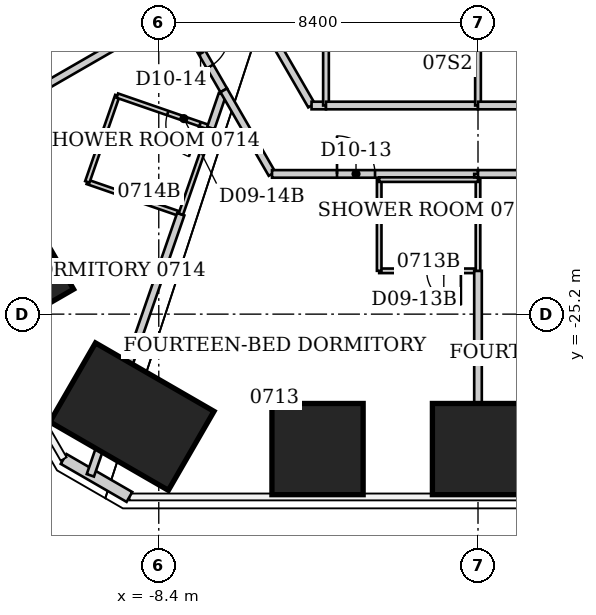
"""IFC4 building model, lengths in metres.
Left out: names, types, materials, properties, quantities, classifications, styles, units other than length and angle.
Written with IfcOpenShell. Run it as: python <this file> out.ifc"""

import sys

from ifc_helpers import new_model, si_unit, direction, frame, frame_2d, origin, origin_2d, place, context, subcontext, project, spatial, rectangle, extrude, element, fill, save


model = new_model("IFC4")
c1 = context("Model", 3, precision=1e-05, world=origin(), true_north=direction((0.0, 1.0)))
c2 = subcontext(c1, "Body", "Model", "MODEL_VIEW")
j1 = project(units=[si_unit("LENGTHUNIT", "METRE"), si_unit("PLANEANGLEUNIT", "RADIAN")], contexts=[c1])
p1 = place(None, origin())
s1 = spatial("IfcSite", under=j1, at=p1, CompositionType="ELEMENT")
p2 = place(p1, origin())
s2 = spatial("IfcBuilding", under=s1, at=p2, CompositionType="ELEMENT")
p3 = place(p2, frame((0.0, 0.0, 34.4)))
s3 = spatial("IfcBuildingStorey", under=s2, at=p3, CompositionType="ELEMENT", Elevation=34.4)
for number, where, z_axis, x_axis in (
    (1, (0.0, -28.751, 0.0), (0.0, 0.0, 1.0), (0.0, -1.0, 0.0)),
    (2, (-4.222, -28.751, 0.0), (0.0, 0.0, 1.0), (0.0, -1.0, 0.0)),
):
    element("IfcColumn", number, at=place(p3, frame(where, z_axis=z_axis, x_axis=x_axis)), inside=s3, PredefinedType="COLUMN", context=c2, shape_type="SweptSolid", body=[
        extrude(rectangle(XDim=2.4, YDim=2.4, at=origin_2d()), origin(), (0.0, 0.0, 1.0), 3.8),
    ])
p4 = place(p3, frame((-9.106, -27.897, 0.0), z_axis=(0.0, 0.0, 1.0), x_axis=(-0.5, -0.866025403784, 0.0)))
e3 = element("IfcColumn", 3, at=p4, inside=s3, PredefinedType="COLUMN", context=c2, shape_type="SweptSolid", body=[
    extrude(rectangle(XDim=2.4, YDim=3.6, at=origin_2d()), origin(), (0.0, 0.0, 1.0), 3.8),
])
p5 = place(p3, frame((-12.282, -24.105, 0.0), z_axis=(0.0, 0.0, 1.0), x_axis=(-0.866025403784, -0.5, 0.0)))
e4 = element("IfcColumn", 4, at=p5, inside=s3, PredefinedType="COLUMN", context=c2, shape_type="SweptSolid", body=[
    extrude(rectangle(XDim=2.4, YDim=2.4, at=origin_2d()), origin(), (0.0, 0.0, 1.0), 3.8),
])
p6 = place(p3, frame((-9.172, -30.011, 0.0), z_axis=(0.0, 0.0, 1.0), x_axis=(-0.866010750942, 0.50002537861, 0.0)))
e5 = element("IfcWall", 5, at=p6, inside=s3, PredefinedType="SOLIDWALL", context=c2, shape_type="SweptSolid", body=[
    extrude(rectangle(XDim=2.0, YDim=0.3, at=frame_2d((1.0, 0.0))), origin(), (0.0, 0.0, 1.0), 3.64),
])
p7 = place(p3, frame((-15.176, -21.38, 0.0), z_axis=(0.0, 0.0, 1.0), x_axis=(0.866276837306, 0.49956425127, 0.0)))
e6 = element("IfcWall", 6, at=p7, inside=s3, PredefinedType="PARTITIONING", context=c2, shape_type="SweptSolid", body=[
    extrude(rectangle(XDim=8.373, YDim=0.2, at=frame_2d((4.186, 0.0))), origin(), (0.0, 0.0, 1.0), 3.64),
])
p8 = place(p3, frame((-10.28, -21.72, 0.0), z_axis=(0.0, 0.0, 1.0), x_axis=(0.94515546045, -0.326620813149, 0.0)))
e7 = element("IfcWall", 7, at=p8, inside=s3, PredefinedType="PARTITIONING", context=c2, shape_type="SweptSolid", body=[
    extrude(rectangle(XDim=2.603, YDim=0.12, at=frame_2d((1.301, 0.0))), origin(), (0.0, 0.0, 1.0), 3.64),
])
p9 = place(p3, frame((-10.2, -29.442, 0.0), z_axis=(0.0, 0.0, 1.0), x_axis=(0.327154379454, 0.944970905374, 0.0)))
e8 = element("IfcWall", 8, at=p9, inside=s3, PredefinedType="PARTITIONING", context=c2, shape_type="SweptSolid", body=[
    extrude(rectangle(XDim=7.272, YDim=0.2, at=frame_2d((3.636, 0.0))), origin(), (0.0, 0.0, 1.0), 3.64),
])
p10 = place(p3, frame((-9.49, -19.45, 0.0), z_axis=(0.0, 0.0, 1.0), x_axis=(-0.328693963496, -0.944436487203, 0.0)))
e9 = element("IfcWall", 9, at=p10, inside=s3, PredefinedType="PARTITIONING", context=c2, shape_type="SweptSolid", body=[
    extrude(rectangle(XDim=2.404, YDim=0.12, at=frame_2d((1.202, 0.0))), origin(), (0.0, 0.0, 1.0), 3.64),
])
p11 = place(p3, frame((-7.91, -17.19, 0.0), z_axis=(0.0, 0.0, 1.0), x_axis=(0.498748634132, -0.866746675766, 0.0)))
e10 = element("IfcWall", 10, at=p11, inside=s3, PredefinedType="PARTITIONING", context=c2, shape_type="SweptSolid", body=[
    extrude(rectangle(XDim=2.446, YDim=0.2, at=frame_2d((1.223, 0.0))), origin(), (0.0, 0.0, 1.0), 3.64),
])
p12 = place(p11, frame((0.723, 0.0, 0.0)))
e11 = element("IfcOpeningElement", 11, at=p12, cuts=e10, PredefinedType="OPENING", context=c2, shape_type="SweptSolid", body=[
    extrude(rectangle(XDim=1.0, YDim=2.13, at=frame_2d((0.5, 1.065))), frame((0.0, 0.1, 0.0), z_axis=(0.0, -1.0, 0.0), x_axis=(1.0, 0.0, 0.0)), (0.0, 0.0, 1.0), 0.2),
])
p13 = place(p3, frame((-7.82, -22.57, 0.0), z_axis=(0.0, 0.0, 1.0), x_axis=(0.328693963496, 0.944436487203, 0.0)))
e12 = element("IfcWall", 12, at=p13, inside=s3, PredefinedType="PARTITIONING", context=c2, shape_type="SweptSolid", body=[
    extrude(rectangle(XDim=2.404, YDim=0.12, at=frame_2d((1.202, 0.0))), origin(), (0.0, 0.0, 1.0), 3.64),
])
p14 = place(p3, frame((-7.03, -20.3, 0.0), z_axis=(0.0, 0.0, 1.0), x_axis=(-0.94515546045, 0.326620813149, 0.0)))
e13 = element("IfcWall", 13, at=p14, inside=s3, PredefinedType="PARTITIONING", context=c2, shape_type="SweptSolid", body=[
    extrude(rectangle(XDim=2.603, YDim=0.12, at=frame_2d((1.301, 0.0))), origin(), (0.0, 0.0, 1.0), 3.64),
])
p15 = place(p14, frame((0.3, 0.0, 0.0)))
e14 = element("IfcOpeningElement", 14, at=p15, cuts=e13, PredefinedType="OPENING", context=c2, shape_type="SweptSolid", body=[
    extrude(rectangle(XDim=0.9, YDim=2.03, at=frame_2d((0.45, 1.015))), frame((0.0, 0.06, 0.0), z_axis=(0.0, -1.0, 0.0), x_axis=(1.0, 0.0, 0.0)), (0.0, 0.0, 1.0), 0.12),
])
p16 = place(p3, frame((-7.03, -20.3, 0.0), z_axis=(0.0, 0.0, 1.0), x_axis=(0.324737408014, 0.94580421644, 0.0)))
e15 = element("IfcWall", 15, at=p16, inside=s3, PredefinedType="PARTITIONING", context=c2, shape_type="SweptSolid", body=[
    extrude(rectangle(XDim=0.937, YDim=0.2, at=frame_2d((0.468, 0.0))), origin(), (0.0, 0.0, 1.0), 3.64),
])
p17 = place(p3, frame((-6.69, -19.31, 0.0), z_axis=(0.0, 0.0, 1.0), x_axis=(0.499963722229, -0.866046347752, 0.0)))
e16 = element("IfcWall", 16, at=p17, inside=s3, PredefinedType="PARTITIONING", context=c2, shape_type="SweptSolid", body=[
    extrude(rectangle(XDim=2.54, YDim=0.2, at=frame_2d((1.27, 0.0))), origin(), (0.0, 0.0, 1.0), 3.64),
])
p18 = place(p3, frame((-5.42, -21.51, 0.0), z_axis=(0.0, 0.0, 1.0), x_axis=(1.0, 0.0, 0.0)))
e17 = element("IfcWall", 17, at=p18, inside=s3, PredefinedType="PARTITIONING", context=c2, shape_type="SweptSolid", body=[
    extrude(rectangle(XDim=5.42, YDim=0.2, at=frame_2d((2.71, 0.0))), origin(), (0.0, 0.0, 1.0), 3.64),
])
p19 = place(p18, frame((1.71, 0.0, 0.0)))
e18 = element("IfcOpeningElement", 18, at=p19, cuts=e17, PredefinedType="OPENING", context=c2, shape_type="SweptSolid", body=[
    extrude(rectangle(XDim=1.0, YDim=2.13, at=frame_2d((0.5, 1.065))), frame((0.0, 0.1, 0.0), z_axis=(0.0, -1.0, 0.0), x_axis=(1.0, 0.0, 0.0)), (0.0, 0.0, 1.0), 0.2),
])
p20 = place(p3, frame((-4.38, -19.71, 0.0), z_axis=(0.0, 0.0, 1.0), x_axis=(-0.500523653757, 0.865722860984, 0.0)))
e19 = element("IfcWall", 19, at=p20, inside=s3, PredefinedType="PARTITIONING", context=c2, shape_type="SweptSolid", body=[
    extrude(rectangle(XDim=6.628, YDim=0.2, at=frame_2d((3.314, 0.0))), origin(), (0.0, 0.0, 1.0), 3.64),
])
p21 = place(p20, frame((2.764, 0.0, 0.0)))
e20 = element("IfcOpeningElement", 20, at=p21, cuts=e19, PredefinedType="OPENING", context=c2, shape_type="SweptSolid", body=[
    extrude(rectangle(XDim=1.1, YDim=2.2, at=frame_2d((0.55, 1.1))), frame((0.0, 0.1, 0.0), z_axis=(0.0, -1.0, 0.0), x_axis=(1.0, 0.0, 0.0)), (0.0, 0.0, 1.0), 0.2),
])
p22 = place(p3, frame((-4.0, -19.71, 0.0), z_axis=(0.0, 0.0, 1.0), x_axis=(-1.0, 0.0, 0.0)))
e21 = element("IfcWall", 21, at=p22, inside=s3, PredefinedType="PARTITIONING", context=c2, shape_type="SweptSolid", body=[
    extrude(rectangle(XDim=0.38, YDim=0.2, at=frame_2d((0.19, 0.0))), origin(), (0.0, 0.0, 1.0), 3.64),
])
p23 = place(p3, frame((-4.0, -14.0, 0.0), z_axis=(0.0, 0.0, 1.0), x_axis=(0.0, -1.0, 0.0)))
e22 = element("IfcWall", 22, at=p23, inside=s3, PredefinedType="PARTITIONING", context=c2, shape_type="SweptSolid", body=[
    extrude(rectangle(XDim=5.71, YDim=0.15, at=frame_2d((2.855, 0.0))), origin(), (0.0, 0.0, 1.0), 3.64),
])
p24 = place(p3, frame((-2.6, -24.06, 0.0), z_axis=(0.0, 0.0, 1.0), x_axis=(1.0, 0.0, 0.0)))
e23 = element("IfcWall", 23, at=p24, inside=s3, PredefinedType="PARTITIONING", context=c2, shape_type="SweptSolid", body=[
    extrude(rectangle(XDim=2.6, YDim=0.12, at=frame_2d((1.3, 0.0))), origin(), (0.0, 0.0, 1.0), 3.64),
])
p25 = place(p24, frame((1.25, 0.0, 0.0)))
e24 = element("IfcOpeningElement", 24, at=p25, cuts=e23, PredefinedType="OPENING", context=c2, shape_type="SweptSolid", body=[
    extrude(rectangle(XDim=0.9, YDim=2.03, at=frame_2d((0.45, 1.015))), frame((0.0, 0.06, 0.0), z_axis=(0.0, -1.0, 0.0), x_axis=(1.0, 0.0, 0.0)), (0.0, 0.0, 1.0), 0.12),
])
p26 = place(p3, frame((-2.6, -21.66, 0.0), z_axis=(0.0, 0.0, 1.0), x_axis=(0.0, -1.0, 0.0)))
e25 = element("IfcWall", 25, at=p26, inside=s3, PredefinedType="PARTITIONING", context=c2, shape_type="SweptSolid", body=[
    extrude(rectangle(XDim=2.4, YDim=0.12, at=frame_2d((1.2, 0.0))), origin(), (0.0, 0.0, 1.0), 3.64),
])
p27 = place(p3, frame((0.0, -29.89, 0.0), z_axis=(0.0, 0.0, 1.0), x_axis=(0.0, 1.0, 0.0)))
e26 = element("IfcWall", 26, at=p27, inside=s3, PredefinedType="PARTITIONING", context=c2, shape_type="SweptSolid", body=[
    extrude(rectangle(XDim=5.83, YDim=0.2, at=frame_2d((2.915, 0.0))), origin(), (0.0, 0.0, 1.0), 2.86),
])
p28 = place(p3, frame((0.0, -24.06, 0.0), z_axis=(0.0, 0.0, 1.0), x_axis=(0.0, 1.0, 0.0)))
e27 = element("IfcWall", 27, at=p28, inside=s3, PredefinedType="PARTITIONING", context=c2, shape_type="SweptSolid", body=[
    extrude(rectangle(XDim=2.4, YDim=0.12, at=frame_2d((1.2, 0.0))), origin(), (0.0, 0.0, 1.0), 2.86),
])
p29 = place(p3, frame((0.0, -21.66, 0.0), z_axis=(0.0, 0.0, 1.0), x_axis=(-1.0, 0.0, 0.0)))
e28 = element("IfcWall", 28, at=p29, inside=s3, PredefinedType="PARTITIONING", context=c2, shape_type="SweptSolid", body=[
    extrude(rectangle(XDim=2.6, YDim=0.12, at=frame_2d((1.3, 0.0))), origin(), (0.0, 0.0, 1.0), 3.64),
])
p30 = place(p3, frame((0.0, -21.6, 0.0), z_axis=(0.0, 0.0, 1.0), x_axis=(0.0, 1.0, 0.0)))
e29 = element("IfcWall", 29, at=p30, inside=s3, PredefinedType="PARTITIONING", context=c2, shape_type="SweptSolid", body=[
    extrude(rectangle(XDim=0.09, YDim=0.2, at=frame_2d((0.045, 0.0))), origin(), (0.0, 0.0, 1.0), 3.64),
])
p31 = place(p3, frame((0.0, -21.51, 0.0), z_axis=(0.0, 0.0, 1.0), x_axis=(1.0, 0.0, 0.0)))
e30 = element("IfcWall", 30, at=p31, inside=s3, PredefinedType="PARTITIONING", context=c2, shape_type="SweptSolid", body=[
    extrude(rectangle(XDim=5.42, YDim=0.2, at=frame_2d((2.71, 0.0))), origin(), (0.0, 0.0, 1.0), 3.64),
])
p32 = place(p31, frame((2.21, 0.0, 0.0)))
e31 = element("IfcOpeningElement", 31, at=p32, cuts=e30, PredefinedType="OPENING", context=c2, shape_type="SweptSolid", body=[
    extrude(rectangle(XDim=1.0, YDim=2.13, at=frame_2d((0.5, 1.065))), frame((0.0, 0.1, 0.0), z_axis=(0.0, -1.0, 0.0), x_axis=(1.0, 0.0, 0.0)), (0.0, 0.0, 1.0), 0.2),
])
p33 = place(p3, frame((0.0, -19.71, 0.0), z_axis=(0.0, 0.0, 1.0), x_axis=(-1.0, 0.0, 0.0)))
e32 = element("IfcWall", 32, at=p33, inside=s3, PredefinedType="PARTITIONING", context=c2, shape_type="SweptSolid", body=[
    extrude(rectangle(XDim=4.0, YDim=0.2, at=frame_2d((2.0, 0.0))), origin(), (0.0, 0.0, 1.0), 3.64),
])
p34 = place(p3, frame((0.0, -13.95, 0.0), z_axis=(0.0, 0.0, 1.0), x_axis=(0.0, -1.0, 0.0)))
e33 = element("IfcWall", 33, at=p34, inside=s3, PredefinedType="PARTITIONING", context=c2, shape_type="SweptSolid", body=[
    extrude(rectangle(XDim=5.76, YDim=0.15, at=frame_2d((2.88, 0.0))), origin(), (0.0, 0.0, 1.0), 2.86),
])
p35 = place(p3, frame((4.0, -19.71, 0.0), z_axis=(0.0, 0.0, 1.0), x_axis=(-1.0, 0.0, 0.0)))
e34 = element("IfcWall", 34, at=p35, inside=s3, PredefinedType="PARTITIONING", context=c2, shape_type="SweptSolid", body=[
    extrude(rectangle(XDim=4.0, YDim=0.2, at=frame_2d((2.0, 0.0))), origin(), (0.0, 0.0, 1.0), 3.64),
])
p36 = place(p35, frame((1.45, 0.0, 0.0)))
e35 = element("IfcOpeningElement", 35, at=p36, cuts=e34, PredefinedType="OPENING", context=c2, shape_type="SweptSolid", body=[
    extrude(rectangle(XDim=1.1, YDim=2.2, at=frame_2d((0.55, 1.1))), frame((0.0, 0.1, 0.0), z_axis=(0.0, -1.0, 0.0), x_axis=(1.0, 0.0, 0.0)), (0.0, 0.0, 1.0), 0.2),
])
p37 = place(p19, origin())
e36 = element("IfcDoor", 36, at=p37, inside=s3, OperationType="SINGLE_SWING_LEFT", PredefinedType="DOOR", context=c2, shape_type="SweptSolid", body=[
    extrude(rectangle(XDim=1.0, YDim=2.13, at=frame_2d((0.5, 1.065))), frame((0.0, 0.025, 0.0), z_axis=(0.0, -1.0, 0.0), x_axis=(1.0, 0.0, 0.0)), (0.0, 0.0, 1.0), 0.05),
])
fill(e18, e36)
p38 = place(p25, origin())
e37 = element("IfcDoor", 37, at=p38, inside=s3, OperationType="SINGLE_SWING_RIGHT", PredefinedType="DOOR", context=c2, shape_type="SweptSolid", body=[
    extrude(rectangle(XDim=0.9, YDim=2.03, at=frame_2d((0.45, 1.015))), frame((0.0, 0.025, 0.0), z_axis=(0.0, -1.0, 0.0), x_axis=(1.0, 0.0, 0.0)), (0.0, 0.0, 1.0), 0.05),
])
fill(e24, e37)
p39 = place(p12, origin())
e38 = element("IfcDoor", 38, at=p39, inside=s3, OperationType="SINGLE_SWING_LEFT", PredefinedType="DOOR", context=c2, shape_type="SweptSolid", body=[
    extrude(rectangle(XDim=1.0, YDim=2.13, at=frame_2d((0.5, 1.065))), frame((0.0, 0.025, 0.0), z_axis=(0.0, -1.0, 0.0), x_axis=(1.0, 0.0, 0.0)), (0.0, 0.0, 1.0), 0.05),
])
fill(e11, e38)
p40 = place(p15, origin())
e39 = element("IfcDoor", 39, at=p40, inside=s3, OperationType="SINGLE_SWING_LEFT", PredefinedType="DOOR", context=c2, shape_type="SweptSolid", body=[
    extrude(rectangle(XDim=0.9, YDim=2.03, at=frame_2d((0.45, 1.015))), frame((0.0, 0.025, 0.0), z_axis=(0.0, -1.0, 0.0), x_axis=(1.0, 0.0, 0.0)), (0.0, 0.0, 1.0), 0.05),
])
fill(e14, e39)
save(model, sys.argv[1])
